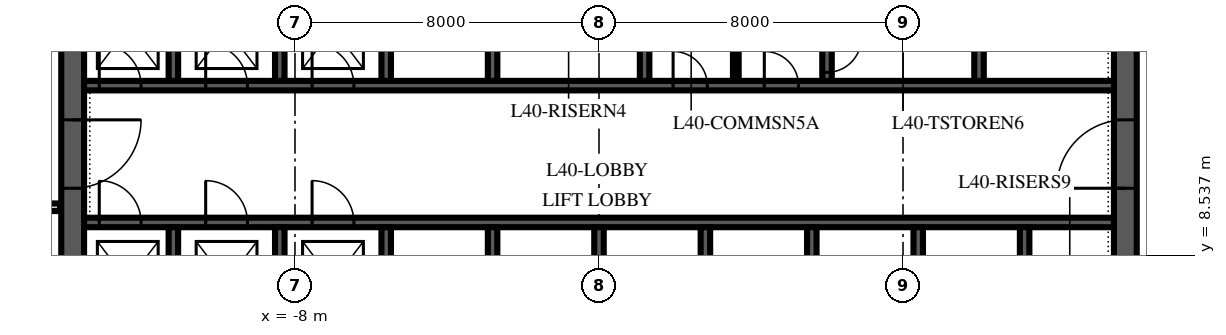
"""IFC4 building model, lengths in metres.
Left out: names, types, materials, properties, quantities, classifications, styles, units other than length and angle.
Written with IfcOpenShell. Run it as: python <this file> out.ifc"""

import sys

from ifc_helpers import new_model, si_unit, direction, frame, frame_2d, origin, place, context, subcontext, project, spatial, polyline, rectangle, outline, extrude, element, fill, save


model = new_model("IFC4")
c1 = context("Model", 3, precision=1e-05, world=origin(), true_north=direction((0.0, 1.0)))
c2 = subcontext(c1, "Body", "Model", "MODEL_VIEW")
j1 = project(units=[si_unit("LENGTHUNIT", "METRE"), si_unit("PLANEANGLEUNIT", "RADIAN")], contexts=[c1])
p1 = place(None, origin())
s1 = spatial("IfcSite", under=j1, at=p1, CompositionType="ELEMENT")
p2 = place(p1, origin())
s2 = spatial("IfcBuilding", under=s1, at=p2, CompositionType="ELEMENT")
p3 = place(p2, frame((0.0, 0.0, 178.0)))
s3 = spatial("IfcBuildingStorey", under=s2, at=p3, CompositionType="ELEMENT", Elevation=178.0)
p4 = place(p3, frame((13.85, 6.15, 0.0), z_axis=(0.0, 0.0, 1.0), x_axis=(0.0, 1.0, 0.0)))
e1 = element("IfcWall", 1, at=p4, inside=s3, PredefinedType="SHEAR", context=c2, shape_type="SweptSolid", body=[
    extrude(outline(polyline([(0.0, -0.3), (17.7, -0.3), (17.7, 0.0), (17.4, 0.0), (17.4, 0.3), (0.3, 0.3), (0.3, 0.0), (0.0, 0.0), (0.0, -0.3)])), origin(), (0.0, 0.0, 1.0), 4.0),
])
p5 = place(p4, frame((4.15, 0.0, 0.0)))
e2 = element("IfcOpeningElement", 2, at=p5, cuts=e1, PredefinedType="OPENING", context=c2, shape_type="SweptSolid", body=[
    extrude(rectangle(XDim=1.8, YDim=2.4, at=frame_2d((0.9, 1.2))), frame((0.0, 0.315, 0.0), z_axis=(0.0, -1.0, 0.0), x_axis=(1.0, 0.0, 0.0)), (0.0, 0.0, 1.0), 0.63),
])
p6 = place(p3, frame((-13.85, 23.85, 0.0), z_axis=(0.0, 0.0, 1.0), x_axis=(0.0, -1.0, 0.0)))
e3 = element("IfcWall", 3, at=p6, inside=s3, PredefinedType="SHEAR", context=c2, shape_type="SweptSolid", body=[
    extrude(outline(polyline([(0.0, -0.3), (17.7, -0.3), (17.7, 0.0), (17.4, 0.0), (17.4, 0.3), (0.3, 0.3), (0.3, 0.0), (0.0, 0.0), (0.0, -0.3)])), origin(), (0.0, 0.0, 1.0), 4.0),
])
p7 = place(p6, frame((11.75, 0.0, 0.0)))
e4 = element("IfcOpeningElement", 4, at=p7, cuts=e3, PredefinedType="OPENING", context=c2, shape_type="SweptSolid", body=[
    extrude(rectangle(XDim=1.8, YDim=2.4, at=frame_2d((0.9, 1.2))), frame((0.0, 0.315, 0.0), z_axis=(0.0, -1.0, 0.0), x_axis=(1.0, 0.0, 0.0)), (0.0, 0.0, 1.0), 0.63),
])
p8 = place(p3, frame((-13.55, 9.4, 0.0), z_axis=(0.0, 0.0, 1.0), x_axis=(1.0, 0.0, 0.0)))
e5 = element("IfcWall", 5, at=p8, inside=s3, PredefinedType="SHEAR", context=c2, shape_type="SweptSolid", body=[
    extrude(rectangle(XDim=27.1, YDim=0.25, at=frame_2d((13.55, 0.0))), origin(), (0.0, 0.0, 1.0), 4.0),
])
p9 = place(p8, frame((0.4, 0.0, 0.0)))
e6 = element("IfcOpeningElement", 6, at=p9, cuts=e5, PredefinedType="OPENING", context=c2, shape_type="SweptSolid", body=[
    extrude(rectangle(XDim=1.1, YDim=2.1, at=frame_2d((0.55, 1.05))), frame((0.0, 0.14, 0.0), z_axis=(0.0, -1.0, 0.0), x_axis=(1.0, 0.0, 0.0)), (0.0, 0.0, 1.0), 0.28),
])
p10 = place(p8, frame((3.2, 0.0, 0.0)))
e7 = element("IfcOpeningElement", 7, at=p10, cuts=e5, PredefinedType="OPENING", context=c2, shape_type="SweptSolid", body=[
    extrude(rectangle(XDim=1.1, YDim=2.1, at=frame_2d((0.55, 1.05))), frame((0.0, 0.14, 0.0), z_axis=(0.0, -1.0, 0.0), x_axis=(1.0, 0.0, 0.0)), (0.0, 0.0, 1.0), 0.28),
])
p11 = place(p8, frame((6.0, 0.0, 0.0)))
e8 = element("IfcOpeningElement", 8, at=p11, cuts=e5, PredefinedType="OPENING", context=c2, shape_type="SweptSolid", body=[
    extrude(rectangle(XDim=1.1, YDim=2.1, at=frame_2d((0.55, 1.05))), frame((0.0, 0.14, 0.0), z_axis=(0.0, -1.0, 0.0), x_axis=(1.0, 0.0, 0.0)), (0.0, 0.0, 1.0), 0.28),
])
p12 = place(p3, frame((-13.55, 13.0, 0.0), z_axis=(0.0, 0.0, 1.0), x_axis=(1.0, 0.0, 0.0)))
e9 = element("IfcWall", 9, at=p12, inside=s3, PredefinedType="SHEAR", context=c2, shape_type="SweptSolid", body=[
    extrude(rectangle(XDim=27.1, YDim=0.25, at=frame_2d((13.55, 0.0))), origin(), (0.0, 0.0, 1.0), 4.0),
])
p13 = place(p12, frame((0.4, 0.0, 0.0)))
e10 = element("IfcOpeningElement", 10, at=p13, cuts=e9, PredefinedType="OPENING", context=c2, shape_type="SweptSolid", body=[
    extrude(rectangle(XDim=1.1, YDim=2.1, at=frame_2d((0.55, 1.05))), frame((0.0, 0.14, 0.0), z_axis=(0.0, -1.0, 0.0), x_axis=(1.0, 0.0, 0.0)), (0.0, 0.0, 1.0), 0.28),
])
p14 = place(p12, frame((3.2, 0.0, 0.0)))
e11 = element("IfcOpeningElement", 11, at=p14, cuts=e9, PredefinedType="OPENING", context=c2, shape_type="SweptSolid", body=[
    extrude(rectangle(XDim=1.1, YDim=2.1, at=frame_2d((0.55, 1.05))), frame((0.0, 0.14, 0.0), z_axis=(0.0, -1.0, 0.0), x_axis=(1.0, 0.0, 0.0)), (0.0, 0.0, 1.0), 0.28),
])
p15 = place(p12, frame((6.0, 0.0, 0.0)))
e12 = element("IfcOpeningElement", 12, at=p15, cuts=e9, PredefinedType="OPENING", context=c2, shape_type="SweptSolid", body=[
    extrude(rectangle(XDim=1.1, YDim=2.1, at=frame_2d((0.55, 1.05))), frame((0.0, 0.14, 0.0), z_axis=(0.0, -1.0, 0.0), x_axis=(1.0, 0.0, 0.0)), (0.0, 0.0, 1.0), 0.28),
])
p16 = place(p12, frame((15.5, 0.0, 0.0)))
e13 = element("IfcOpeningElement", 13, at=p16, cuts=e9, PredefinedType="OPENING", context=c2, shape_type="SweptSolid", body=[
    extrude(rectangle(XDim=0.9, YDim=2.1, at=frame_2d((0.45, 1.05))), frame((0.0, 0.14, 0.0), z_axis=(0.0, -1.0, 0.0), x_axis=(1.0, 0.0, 0.0)), (0.0, 0.0, 1.0), 0.28),
])
p17 = place(p12, frame((17.9, 0.0, 0.0)))
e14 = element("IfcOpeningElement", 14, at=p17, cuts=e9, PredefinedType="OPENING", context=c2, shape_type="SweptSolid", body=[
    extrude(rectangle(XDim=0.9, YDim=2.1, at=frame_2d((0.45, 1.05))), frame((0.0, 0.14, 0.0), z_axis=(0.0, -1.0, 0.0), x_axis=(1.0, 0.0, 0.0)), (0.0, 0.0, 1.0), 0.28),
])
for number, where, z_axis, x_axis in (
    (15, (-11.2, 6.45, 0.0), (0.0, 0.0, 1.0), (0.0, 1.0, 0.0)),
    (16, (-8.4, 6.45, 0.0), (0.0, 0.0, 1.0), (0.0, 1.0, 0.0)),
    (17, (-5.6, 6.45, 0.0), (0.0, 0.0, 1.0), (0.0, 1.0, 0.0)),
    (18, (-2.8, 6.45, 0.0), (0.0, 0.0, 1.0), (0.0, 1.0, 0.0)),
    (19, (0.0, 6.45, 0.0), (0.0, 0.0, 1.0), (0.0, 1.0, 0.0)),
    (20, (2.8, 6.45, 0.0), (0.0, 0.0, 1.0), (0.0, 1.0, 0.0)),
    (21, (5.6, 6.45, 0.0), (0.0, 0.0, 1.0), (0.0, 1.0, 0.0)),
    (22, (8.4, 6.45, 0.0), (0.0, 0.0, 1.0), (0.0, 1.0, 0.0)),
    (23, (11.2, 6.45, 0.0), (0.0, 0.0, 1.0), (0.0, 1.0, 0.0)),
):
    element("IfcWall", number, at=place(p3, frame(where, z_axis=z_axis, x_axis=x_axis)), inside=s3, PredefinedType="SHEAR", context=c2, shape_type="SweptSolid", body=[
        extrude(rectangle(XDim=2.825, YDim=0.25, at=frame_2d((1.413, 0.0))), origin(), (0.0, 0.0, 1.0), 4.0),
    ])
for number, where, z_axis, x_axis in (
    (24, (-11.2, 13.125, 0.0), (0.0, 0.0, 1.0), (0.0, 1.0, 0.0)),
    (25, (-8.4, 13.125, 0.0), (0.0, 0.0, 1.0), (0.0, 1.0, 0.0)),
    (26, (-5.6, 13.125, 0.0), (0.0, 0.0, 1.0), (0.0, 1.0, 0.0)),
    (27, (-2.8, 13.125, 0.0), (0.0, 0.0, 1.0), (0.0, 1.0, 0.0)),
    (28, (1.2, 13.125, 0.0), (0.0, 0.0, 1.0), (0.0, 1.0, 0.0)),
):
    element("IfcWall", number, at=place(p3, frame(where, z_axis=z_axis, x_axis=x_axis)), inside=s3, PredefinedType="SHEAR", context=c2, shape_type="SweptSolid", body=[
        extrude(rectangle(XDim=2.75, YDim=0.25, at=frame_2d((1.375, 0.0))), origin(), (0.0, 0.0, 1.0), 4.0),
    ])
p18 = place(p3, frame((6.0, 13.125, 0.0), z_axis=(0.0, 0.0, 1.0), x_axis=(0.0, 1.0, 0.0)))
e29 = element("IfcWall", 29, at=p18, inside=s3, PredefinedType="SHEAR", context=c2, shape_type="SweptSolid", body=[
    extrude(rectangle(XDim=2.75, YDim=0.25, at=frame_2d((1.375, 0.0))), origin(), (0.0, 0.0, 1.0), 4.0),
])
p19 = place(p18, frame((0.225, 0.0, 0.0)))
e30 = element("IfcOpeningElement", 30, at=p19, cuts=e29, PredefinedType="OPENING", context=c2, shape_type="SweptSolid", body=[
    extrude(rectangle(XDim=0.9, YDim=2.1, at=frame_2d((0.45, 1.05))), frame((0.0, 0.14, 0.0), z_axis=(0.0, -1.0, 0.0), x_axis=(1.0, 0.0, 0.0)), (0.0, 0.0, 1.0), 0.28),
])
p20 = place(p3, frame((10.0, 13.125, 0.0), z_axis=(0.0, 0.0, 1.0), x_axis=(0.0, 1.0, 0.0)))
e31 = element("IfcWall", 31, at=p20, inside=s3, PredefinedType="SHEAR", context=c2, shape_type="SweptSolid", body=[
    extrude(rectangle(XDim=2.75, YDim=0.25, at=frame_2d((1.375, 0.0))), origin(), (0.0, 0.0, 1.0), 4.0),
])
p21 = place(p3, frame((3.6, 13.125, 0.0), z_axis=(0.0, 0.0, 1.0), x_axis=(0.0, 1.0, 0.0)))
e32 = element("IfcWall", 32, at=p21, inside=s3, PredefinedType="PARTITIONING", context=c2, shape_type="SweptSolid", body=[
    extrude(rectangle(XDim=2.75, YDim=0.15, at=frame_2d((1.375, 0.0))), origin(), (0.0, 0.0, 1.0), 3.85),
])
p22 = place(p3, frame((-16.2, 9.8, 0.0), z_axis=(0.0, 0.0, 1.0), x_axis=(1.0, 0.0, 0.0)))
e33 = element("IfcWall", 33, at=p22, inside=s3, PredefinedType="PARTITIONING", context=c2, shape_type="SweptSolid", body=[
    extrude(rectangle(XDim=2.02, YDim=0.2, at=frame_2d((1.01, 0.0))), origin(), (0.0, 0.0, 1.0), 3.85),
])
p23 = place(p5, origin())
e34 = element("IfcDoor", 34, at=p23, inside=s3, OperationType="DOUBLE_DOOR_SINGLE_SWING", PredefinedType="DOOR", context=c2, shape_type="SweptSolid", body=[
    extrude(rectangle(XDim=1.8, YDim=2.4, at=frame_2d((0.9, 1.2))), frame((0.0, 0.3, 0.0), z_axis=(0.0, -1.0, 0.0), x_axis=(1.0, 0.0, 0.0)), (0.0, 0.0, 1.0), 0.6),
])
fill(e2, e34)
p24 = place(p7, origin())
e35 = element("IfcDoor", 35, at=p24, inside=s3, OperationType="DOUBLE_DOOR_SINGLE_SWING", PredefinedType="DOOR", context=c2, shape_type="SweptSolid", body=[
    extrude(rectangle(XDim=1.8, YDim=2.4, at=frame_2d((0.9, 1.2))), frame((0.0, 0.3, 0.0), z_axis=(0.0, -1.0, 0.0), x_axis=(1.0, 0.0, 0.0)), (0.0, 0.0, 1.0), 0.6),
])
fill(e4, e35)
p25 = place(p9, origin())
e36 = element("IfcDoor", 36, at=p25, inside=s3, OperationType="SLIDING_TO_LEFT", PredefinedType="DOOR", context=c2, shape_type="SweptSolid", body=[
    extrude(rectangle(XDim=1.1, YDim=2.1, at=frame_2d((0.55, 1.05))), frame((0.0, 0.125, 0.0), z_axis=(0.0, -1.0, 0.0), x_axis=(1.0, 0.0, 0.0)), (0.0, 0.0, 1.0), 0.25),
])
fill(e6, e36)
p26 = place(p10, origin())
e37 = element("IfcDoor", 37, at=p26, inside=s3, OperationType="SLIDING_TO_LEFT", PredefinedType="DOOR", context=c2, shape_type="SweptSolid", body=[
    extrude(rectangle(XDim=1.1, YDim=2.1, at=frame_2d((0.55, 1.05))), frame((0.0, 0.125, 0.0), z_axis=(0.0, -1.0, 0.0), x_axis=(1.0, 0.0, 0.0)), (0.0, 0.0, 1.0), 0.25),
])
fill(e7, e37)
p27 = place(p11, origin())
e38 = element("IfcDoor", 38, at=p27, inside=s3, OperationType="SLIDING_TO_LEFT", PredefinedType="DOOR", context=c2, shape_type="SweptSolid", body=[
    extrude(rectangle(XDim=1.1, YDim=2.1, at=frame_2d((0.55, 1.05))), frame((0.0, 0.125, 0.0), z_axis=(0.0, -1.0, 0.0), x_axis=(1.0, 0.0, 0.0)), (0.0, 0.0, 1.0), 0.25),
])
fill(e8, e38)
p28 = place(p13, origin())
e39 = element("IfcDoor", 39, at=p28, inside=s3, OperationType="SLIDING_TO_LEFT", PredefinedType="DOOR", context=c2, shape_type="SweptSolid", body=[
    extrude(rectangle(XDim=1.1, YDim=2.1, at=frame_2d((0.55, 1.05))), frame((0.0, 0.125, 0.0), z_axis=(0.0, -1.0, 0.0), x_axis=(1.0, 0.0, 0.0)), (0.0, 0.0, 1.0), 0.25),
])
fill(e10, e39)
p29 = place(p14, origin())
e40 = element("IfcDoor", 40, at=p29, inside=s3, OperationType="SLIDING_TO_LEFT", PredefinedType="DOOR", context=c2, shape_type="SweptSolid", body=[
    extrude(rectangle(XDim=1.1, YDim=2.1, at=frame_2d((0.55, 1.05))), frame((0.0, 0.125, 0.0), z_axis=(0.0, -1.0, 0.0), x_axis=(1.0, 0.0, 0.0)), (0.0, 0.0, 1.0), 0.25),
])
fill(e11, e40)
p30 = place(p15, origin())
e41 = element("IfcDoor", 41, at=p30, inside=s3, OperationType="SLIDING_TO_LEFT", PredefinedType="DOOR", context=c2, shape_type="SweptSolid", body=[
    extrude(rectangle(XDim=1.1, YDim=2.1, at=frame_2d((0.55, 1.05))), frame((0.0, 0.125, 0.0), z_axis=(0.0, -1.0, 0.0), x_axis=(1.0, 0.0, 0.0)), (0.0, 0.0, 1.0), 0.25),
])
fill(e12, e41)
p31 = place(p16, origin())
e42 = element("IfcDoor", 42, at=p31, inside=s3, OperationType="SINGLE_SWING_LEFT", PredefinedType="DOOR", context=c2, shape_type="SweptSolid", body=[
    extrude(rectangle(XDim=0.9, YDim=2.1, at=frame_2d((0.45, 1.05))), frame((0.0, 0.125, 0.0), z_axis=(0.0, -1.0, 0.0), x_axis=(1.0, 0.0, 0.0)), (0.0, 0.0, 1.0), 0.25),
])
fill(e13, e42)
p32 = place(p17, origin())
e43 = element("IfcDoor", 43, at=p32, inside=s3, OperationType="SINGLE_SWING_LEFT", PredefinedType="DOOR", context=c2, shape_type="SweptSolid", body=[
    extrude(rectangle(XDim=0.9, YDim=2.1, at=frame_2d((0.45, 1.05))), frame((0.0, 0.125, 0.0), z_axis=(0.0, -1.0, 0.0), x_axis=(1.0, 0.0, 0.0)), (0.0, 0.0, 1.0), 0.25),
])
fill(e14, e43)
p33 = place(p19, frame((0.9, 0.0, 0.0), z_axis=(0.0, 0.0, 1.0), x_axis=(-1.0, 0.0, 0.0)))
e44 = element("IfcDoor", 44, at=p33, inside=s3, OperationType="SINGLE_SWING_LEFT", PredefinedType="DOOR", context=c2, shape_type="SweptSolid", body=[
    extrude(rectangle(XDim=0.9, YDim=2.1, at=frame_2d((0.45, 1.05))), frame((0.0, 0.125, 0.0), z_axis=(0.0, -1.0, 0.0), x_axis=(1.0, 0.0, 0.0)), (0.0, 0.0, 1.0), 0.25),
])
fill(e30, e44)
save(model, sys.argv[1])
